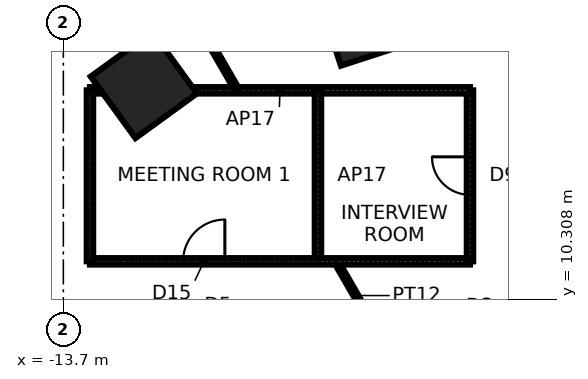
"""IFC4 building model, lengths in metres.
Left out: names, types, materials, properties, quantities, classifications, styles, units other than length and angle.
Written with IfcOpenShell. Run it as: python <this file> out.ifc"""

import sys

from ifc_helpers import new_model, si_unit, direction, frame, frame_2d, origin, origin_2d, place, context, subcontext, project, spatial, rectangle, extrude, element, fill, save


model = new_model("IFC4")
c1 = context("Model", 3, precision=1e-05, world=origin(), true_north=direction((0.0, 1.0)))
c2 = subcontext(c1, "Body", "Model", "MODEL_VIEW")
j1 = project(units=[si_unit("LENGTHUNIT", "METRE"), si_unit("PLANEANGLEUNIT", "RADIAN")], contexts=[c1])
p1 = place(None, origin())
s1 = spatial("IfcSite", under=j1, at=p1, CompositionType="ELEMENT")
p2 = place(p1, origin())
s2 = spatial("IfcBuilding", under=s1, at=p2, CompositionType="ELEMENT")
p3 = place(p2, frame((0.0, 0.0, 23.8)))
s3 = spatial("IfcBuildingStorey", under=s2, at=p3, CompositionType="ELEMENT", Elevation=23.8)
for number, where, z_axis, x_axis in (
    (1, (-5.754, 17.708, 0.0), (0.0, 0.0, 1.0), (-0.309, 0.951, 0.0)),
    (2, (-11.581, 15.94, 0.0), (0.0, 0.0, 1.0), (-0.588, 0.809, 0.0)),
):
    element("IfcColumn", number, at=place(p3, frame(where, z_axis=z_axis, x_axis=x_axis)), inside=s3, PredefinedType="COLUMN", context=c2, shape_type="SweptSolid", body=[
        extrude(rectangle(XDim=2.0, YDim=2.0, at=origin_2d()), origin(), (0.0, 0.0, 1.0), 4.2),
    ])
p4 = place(p3, frame((-3.0, 11.3, 0.0), z_axis=(0.0, 0.0, 1.0), x_axis=(0.0, 1.0, 0.0)))
e3 = element("IfcWall", 3, at=p4, inside=s3, PredefinedType="PARTITIONING", context=c2, shape_type="SweptSolid", body=[
    extrude(rectangle(XDim=4.5, YDim=0.17, at=frame_2d((2.25, 0.0))), origin(), (0.0, 0.0, 1.0), 4.04),
])
p5 = place(p4, frame((1.75, 0.0, 0.0)))
e4 = element("IfcOpeningElement", 4, at=p5, cuts=e3, PredefinedType="OPENING", context=c2, shape_type="SweptSolid", body=[
    extrude(rectangle(XDim=1.0, YDim=2.4, at=frame_2d((0.5, 1.2))), frame((0.0, 0.095, 0.0), z_axis=(0.0, -1.0, 0.0), x_axis=(1.0, 0.0, 0.0)), (0.0, 0.0, 1.0), 0.19),
])
p6 = place(p3, frame((-3.0, 15.8, 0.0), z_axis=(0.0, 0.0, 1.0), x_axis=(-1.0, 0.0, 0.0)))
e5 = element("IfcWall", 5, at=p6, inside=s3, PredefinedType="PARTITIONING", context=c2, shape_type="SweptSolid", body=[
    extrude(rectangle(XDim=10.0, YDim=0.17, at=frame_2d((5.0, 0.0))), origin(), (0.0, 0.0, 1.0), 4.04),
])
p7 = place(p3, frame((-7.0, 15.8, 0.0), z_axis=(0.0, 0.0, 1.0), x_axis=(0.0, -1.0, 0.0)))
e6 = element("IfcWall", 6, at=p7, inside=s3, PredefinedType="PARTITIONING", context=c2, shape_type="SweptSolid", body=[
    extrude(rectangle(XDim=4.5, YDim=0.17, at=frame_2d((2.25, 0.0))), origin(), (0.0, 0.0, 1.0), 4.04),
])
p8 = place(p3, frame((-5.485, 9.5, 0.0), z_axis=(0.0, 0.0, 1.0), x_axis=(-0.499929208183, 0.866066271601, 0.0)))
e7 = element("IfcWall", 7, at=p8, inside=s3, PredefinedType="PARTITIONING", context=c2, shape_type="SweptSolid", body=[
    extrude(rectangle(XDim=2.078, YDim=0.12, at=frame_2d((1.039, 0.0))), origin(), (0.0, 0.0, 1.0), 4.04),
])
p9 = place(p3, frame((-9.122, 15.8, 0.0), z_axis=(0.0, 0.0, 1.0), x_axis=(-0.500002773681, 0.866023802393, 0.0)))
e8 = element("IfcWall", 8, at=p9, inside=s3, PredefinedType="PARTITIONING", context=c2, shape_type="SweptSolid", body=[
    extrude(rectangle(XDim=5.654, YDim=0.12, at=frame_2d((2.827, 0.0))), origin(), (0.0, 0.0, 1.0), 4.04),
])
p10 = place(p3, frame((-13.0, 11.3, 0.0), z_axis=(0.0, 0.0, 1.0), x_axis=(1.0, 0.0, 0.0)))
e9 = element("IfcWall", 9, at=p10, inside=s3, PredefinedType="PARTITIONING", context=c2, shape_type="SweptSolid", body=[
    extrude(rectangle(XDim=10.0, YDim=0.17, at=frame_2d((5.0, 0.0))), origin(), (0.0, 0.0, 1.0), 4.04),
])
p11 = place(p10, frame((2.45, 0.0, 0.0)))
e10 = element("IfcOpeningElement", 10, at=p11, cuts=e9, PredefinedType="OPENING", context=c2, shape_type="SweptSolid", body=[
    extrude(rectangle(XDim=1.1, YDim=2.4, at=frame_2d((0.55, 1.2))), frame((0.0, 0.095, 0.0), z_axis=(0.0, -1.0, 0.0), x_axis=(1.0, 0.0, 0.0)), (0.0, 0.0, 1.0), 0.19),
])
p12 = place(p3, frame((-13.0, 15.8, 0.0), z_axis=(0.0, 0.0, 1.0), x_axis=(0.0, -1.0, 0.0)))
e11 = element("IfcWall", 11, at=p12, inside=s3, PredefinedType="PARTITIONING", context=c2, shape_type="SweptSolid", body=[
    extrude(rectangle(XDim=4.5, YDim=0.17, at=frame_2d((2.25, 0.0))), origin(), (0.0, 0.0, 1.0), 4.04),
])
p13 = place(p11, origin())
e12 = element("IfcDoor", 12, at=p13, inside=s3, OperationType="SINGLE_SWING_RIGHT", PredefinedType="DOOR", context=c2, shape_type="SweptSolid", body=[
    extrude(rectangle(XDim=1.1, YDim=2.4, at=frame_2d((0.55, 1.2))), frame((0.0, 0.025, 0.0), z_axis=(0.0, -1.0, 0.0), x_axis=(1.0, 0.0, 0.0)), (0.0, 0.0, 1.0), 0.05),
])
fill(e10, e12)
p14 = place(p5, origin())
e13 = element("IfcDoor", 13, at=p14, inside=s3, OperationType="SINGLE_SWING_RIGHT", PredefinedType="DOOR", context=c2, shape_type="SweptSolid", body=[
    extrude(rectangle(XDim=1.0, YDim=2.4, at=frame_2d((0.5, 1.2))), frame((0.0, 0.025, 0.0), z_axis=(0.0, -1.0, 0.0), x_axis=(1.0, 0.0, 0.0)), (0.0, 0.0, 1.0), 0.05),
])
fill(e4, e13)
save(model, sys.argv[1])
